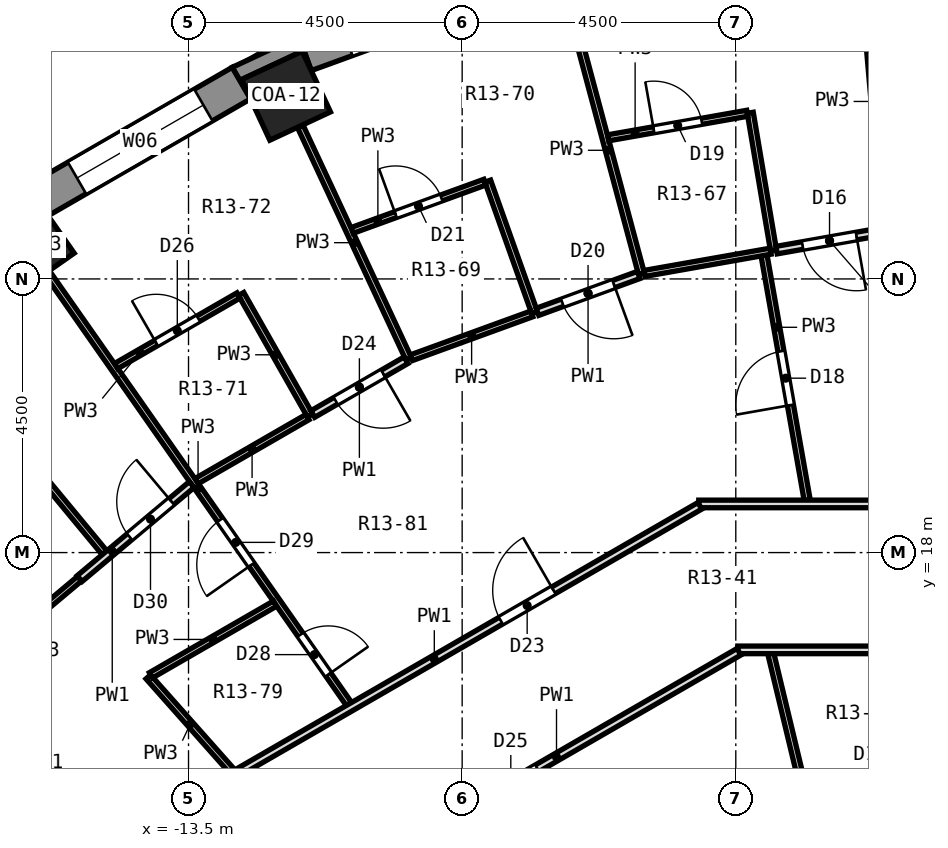
"""IFC4 building model, lengths in metres.
Left out: names, types, materials, properties, quantities, classifications, styles, units other than length and angle.
Written with IfcOpenShell. Run it as: python <this file> out.ifc"""

import sys

from ifc_helpers import new_model, si_unit, direction, frame, frame_2d, origin, origin_2d, place, context, subcontext, project, spatial, polyline, rectangle, outline, extrude, element, fill, save


model = new_model("IFC4")
c1 = context("Model", 3, precision=1e-05, world=origin(), true_north=direction((0.0, 1.0)))
c2 = subcontext(c1, "Body", "Model", "MODEL_VIEW")
j1 = project(units=[si_unit("LENGTHUNIT", "METRE"), si_unit("PLANEANGLEUNIT", "RADIAN")], contexts=[c1])
p1 = place(None, origin())
s1 = spatial("IfcSite", under=j1, at=p1, CompositionType="ELEMENT")
p2 = place(p1, origin())
s2 = spatial("IfcBuilding", under=s1, at=p2, CompositionType="ELEMENT")
p3 = place(p2, frame((0.0, 0.0, 65.9)))
s3 = spatial("IfcBuildingStorey", under=s2, at=p3, CompositionType="ELEMENT", Elevation=65.9)
for number, where, z_axis, x_axis in (
    (1, (-11.897, 25.512, 0.0), (0.0, 0.0, 1.0), (-0.423, 0.906, 0.0)),
    (2, (-16.146, 23.059, 0.0), (0.0, 0.0, 1.0), (-0.574, 0.819, 0.0)),
):
    element("IfcColumn", number, at=place(p3, frame(where, z_axis=z_axis, x_axis=x_axis)), inside=s3, PredefinedType="COLUMN", context=c2, shape_type="SweptSolid", body=[
        extrude(rectangle(XDim=1.1, YDim=1.1, at=origin_2d()), origin(), (0.0, 0.0, 1.0), 3.3),
    ])
p4 = place(p3, frame((-7.971, 27.523, 0.0), z_axis=(0.0, 0.0, 1.0), x_axis=(-0.939689588564, -0.342028474173, 0.0)))
e3 = element("IfcWall", 3, at=p4, inside=s3, PredefinedType="SOLIDWALL", context=c2, shape_type="SweptSolid", body=[
    extrude(rectangle(XDim=3.846, YDim=0.6, at=frame_2d((1.923, 0.0))), origin(), (0.0, 0.0, 1.0), 2.75),
])
p5 = place(p4, frame((0.723, 0.0, 0.9)))
e4 = element("IfcOpeningElement", 4, at=p5, cuts=e3, PredefinedType="OPENING", context=c2, shape_type="SweptSolid", body=[
    extrude(rectangle(XDim=2.4, YDim=1.8, at=frame_2d((1.2, 0.9))), frame((0.0, 0.312, 0.0), z_axis=(0.0, -1.0, 0.0), x_axis=(1.0, 0.0, 0.0)), (0.0, 0.0, 1.0), 0.624),
])
p6 = place(p3, frame((-12.63, 25.721, 0.0), z_axis=(0.0, 0.0, 1.0), x_axis=(-0.86603124159, -0.499989888488, 0.0)))
e5 = element("IfcWall", 5, at=p6, inside=s3, PredefinedType="SOLIDWALL", context=c2, shape_type="SweptSolid", body=[
    extrude(rectangle(XDim=3.846, YDim=0.6, at=frame_2d((1.923, 0.0))), origin(), (0.0, 0.0, 1.0), 2.75),
])
p7 = place(p6, frame((0.723, 0.0, 0.9)))
e6 = element("IfcOpeningElement", 6, at=p7, cuts=e5, PredefinedType="OPENING", context=c2, shape_type="SweptSolid", body=[
    extrude(rectangle(XDim=2.4, YDim=1.8, at=frame_2d((1.2, 0.9))), frame((0.0, 0.312, 0.0), z_axis=(0.0, -1.0, 0.0), x_axis=(1.0, 0.0, 0.0)), (0.0, 0.0, 1.0), 0.624),
])
p8 = place(p3, origin())
e7 = element("IfcWall", 7, at=p8, inside=s3, PredefinedType="SOLIDWALL", context=c2, shape_type="SweptSolid", body=[
    extrude(outline(polyline([(-12.78, 25.981), (-12.479, 25.461), (-12.628, 25.779), (-11.631, 26.243), (-11.483, 25.926), (-11.688, 26.49), (-12.78, 25.981)])), origin(), (0.0, 0.0, 1.0), 2.75),
])
p9 = place(p3, frame((-2.405, 27.485, 0.0), z_axis=(0.0, 0.0, 1.0), x_axis=(0.086512794622, -0.996250739707, 0.0)))
e8 = element("IfcWall", 8, at=p9, inside=s3, PredefinedType="PARTITIONING", context=c2, shape_type="SweptSolid", body=[
    extrude(rectangle(XDim=4.148, YDim=0.1, at=frame_2d((2.074, 0.0))), origin(), (0.0, 0.0, 1.0), 2.75),
])
p10 = place(p3, frame((-4.262, 25.233, 0.0), z_axis=(0.0, 0.0, 1.0), x_axis=(0.166550297596, -0.986032960083, 0.0)))
e9 = element("IfcWall", 9, at=p10, inside=s3, PredefinedType="PARTITIONING", context=c2, shape_type="SweptSolid", body=[
    extrude(rectangle(XDim=2.3, YDim=0.1, at=frame_2d((1.15, 0.0))), origin(), (0.0, 0.0, 1.0), 2.75),
])
p11 = place(p3, frame((-4.035, 22.887, 0.0), z_axis=(0.0, 0.0, 1.0), x_axis=(0.173584282426, -0.98481901733, 0.0)))
e10 = element("IfcWall", 10, at=p11, inside=s3, PredefinedType="PARTITIONING", context=c2, shape_type="SweptSolid", body=[
    extrude(rectangle(XDim=4.087, YDim=0.1, at=frame_2d((2.043, 0.0))), origin(), (0.0, 0.0, 1.0), 2.75),
])
p12 = place(p11, frame((1.6, 0.0, 0.0)))
e11 = element("IfcOpeningElement", 11, at=p12, cuts=e10, PredefinedType="OPENING", context=c2, shape_type="SweptSolid", body=[
    extrude(rectangle(XDim=0.9, YDim=2.1, at=frame_2d((0.45, 1.05))), frame((0.0, 0.062, 0.0), z_axis=(0.0, -1.0, 0.0), x_axis=(1.0, 0.0, 0.0)), (0.0, 0.0, 1.0), 0.124),
])
p13 = place(p3, frame((-3.924, 16.339, 0.0), z_axis=(0.0, 0.0, 1.0), x_axis=(0.233760395351, -0.972294234049, 0.0)))
e12 = element("IfcWall", 12, at=p13, inside=s3, PredefinedType="PARTITIONING", context=c2, shape_type="SweptSolid", body=[
    extrude(rectangle(XDim=2.097, YDim=0.1, at=frame_2d((1.049, 0.0))), origin(), (0.0, 0.0, 1.0), 2.75),
])
p14 = place(p3, frame((-7.14, 26.65, 0.0), z_axis=(0.0, 0.0, 1.0), x_axis=(0.258611481132, -0.965981418986, 0.0)))
e13 = element("IfcWall", 13, at=p14, inside=s3, PredefinedType="PARTITIONING", context=c2, shape_type="SweptSolid", body=[
    extrude(rectangle(XDim=4.211, YDim=0.1, at=frame_2d((2.106, 0.0))), origin(), (0.0, 0.0, 1.0), 2.75),
])
p15 = place(p3, frame((-8.579, 24.109, 0.0), z_axis=(0.0, 0.0, 1.0), x_axis=(0.335206501266, -0.942144681835, 0.0)))
e14 = element("IfcWall", 14, at=p15, inside=s3, PredefinedType="PARTITIONING", context=c2, shape_type="SweptSolid", body=[
    extrude(rectangle(XDim=2.3, YDim=0.1, at=frame_2d((1.15, 0.0))), origin(), (0.0, 0.0, 1.0), 2.75),
])
p16 = place(p3, frame((-11.66, 25.005, 0.0), z_axis=(0.0, 0.0, 1.0), x_axis=(0.422631582156, -0.906301575506, 0.0)))
e15 = element("IfcWall", 15, at=p16, inside=s3, PredefinedType="PARTITIONING", context=c2, shape_type="SweptSolid", body=[
    extrude(rectangle(XDim=4.212, YDim=0.1, at=frame_2d((2.106, 0.0))), origin(), (0.0, 0.0, 1.0), 2.75),
])
p17 = place(p3, frame((-12.635, 22.253, 0.0), z_axis=(0.0, 0.0, 1.0), x_axis=(0.493564284385, -0.869709317634, 0.0)))
e16 = element("IfcWall", 16, at=p17, inside=s3, PredefinedType="PARTITIONING", context=c2, shape_type="SweptSolid", body=[
    extrude(rectangle(XDim=2.3, YDim=0.1, at=frame_2d((1.15, 0.0))), origin(), (0.0, 0.0, 1.0), 2.75),
])
p18 = place(p3, frame((-15.825, 22.601, 0.0), z_axis=(0.0, 0.0, 1.0), x_axis=(0.57339608395, -0.819278298816, 0.0)))
e17 = element("IfcWall", 17, at=p18, inside=s3, PredefinedType="PARTITIONING", context=c2, shape_type="SweptSolid", body=[
    extrude(rectangle(XDim=8.655, YDim=0.1, at=frame_2d((4.328, 0.0))), origin(), (0.0, 0.0, 1.0), 2.75),
])
p19 = place(p18, frame((7.264, 0.0, 0.0)))
e18 = element("IfcOpeningElement", 18, at=p19, cuts=e17, PredefinedType="OPENING", context=c2, shape_type="SweptSolid", body=[
    extrude(rectangle(XDim=0.8, YDim=2.1, at=frame_2d((0.4, 1.05))), frame((0.0, 0.062, 0.0), z_axis=(0.0, -1.0, 0.0), x_axis=(1.0, 0.0, 0.0)), (0.0, 0.0, 1.0), 0.124),
])
p20 = place(p18, frame((4.96, 0.0, 0.0)))
e19 = element("IfcOpeningElement", 19, at=p20, cuts=e17, PredefinedType="OPENING", context=c2, shape_type="SweptSolid", body=[
    extrude(rectangle(XDim=0.9, YDim=2.1, at=frame_2d((0.45, 1.05))), frame((0.0, 0.062, 0.0), z_axis=(0.0, -1.0, 0.0), x_axis=(1.0, 0.0, 0.0)), (0.0, 0.0, 1.0), 0.124),
])
p21 = place(p3, frame((-16.308, 19.721, 0.0), z_axis=(0.0, 0.0, 1.0), x_axis=(0.637464982276, -0.770479328971, 0.0)))
e20 = element("IfcWall", 20, at=p21, inside=s3, PredefinedType="PARTITIONING", context=c2, shape_type="SweptSolid", body=[
    extrude(rectangle(XDim=2.237, YDim=0.1, at=frame_2d((1.119, 0.0))), origin(), (0.0, 0.0, 1.0), 2.75),
])
p22 = place(p3, frame((-14.162, 15.957, 0.0), z_axis=(0.0, 0.0, 1.0), x_axis=(0.663919519931, -0.747804032521, 0.0)))
e21 = element("IfcWall", 21, at=p22, inside=s3, PredefinedType="PARTITIONING", context=c2, shape_type="SweptSolid", body=[
    extrude(rectangle(XDim=2.081, YDim=0.1, at=frame_2d((1.041, 0.0))), origin(), (0.0, 0.0, 1.0), 2.75),
])
p23 = place(p3, frame((-4.466, 16.4, 0.0), z_axis=(0.0, 0.0, 1.0), x_axis=(1.0, 0.0, 0.0)))
e22 = element("IfcWall", 22, at=p23, inside=s3, PredefinedType="PARTITIONING", context=c2, shape_type="SweptSolid", body=[
    extrude(rectangle(XDim=8.798, YDim=0.125, at=frame_2d((4.399, 0.0))), origin(), (0.0, 0.0, 1.0), 2.75),
])
p24 = place(p3, frame((-5.109, 18.8, 0.0), z_axis=(0.0, 0.0, 1.0), x_axis=(1.0, 0.0, 0.0)))
e23 = element("IfcWall", 23, at=p24, inside=s3, PredefinedType="PARTITIONING", context=c2, shape_type="SweptSolid", body=[
    extrude(rectangle(XDim=10.084, YDim=0.125, at=frame_2d((5.042, 0.0))), origin(), (0.0, 0.0, 1.0), 2.75),
])
p25 = place(p3, frame((-6.002, 22.591, 0.0), z_axis=(0.0, 0.0, 1.0), x_axis=(0.984798730273, 0.173699340392, 0.0)))
e24 = element("IfcWall", 24, at=p25, inside=s3, PredefinedType="PARTITIONING", context=c2, shape_type="SweptSolid", body=[
    extrude(rectangle(XDim=2.105, YDim=0.1, at=frame_2d((1.053, 0.0))), origin(), (0.0, 0.0, 1.0), 2.75),
])
p26 = place(p3, frame((-3.83, 22.974, 0.0), z_axis=(0.0, 0.0, 1.0), x_axis=(0.98477522439, 0.17383255572, 0.0)))
e25 = element("IfcWall", 25, at=p26, inside=s3, PredefinedType="PARTITIONING", context=c2, shape_type="SweptSolid", body=[
    extrude(rectangle(XDim=1.77, YDim=0.125, at=frame_2d((0.885, 0.0))), origin(), (0.0, 0.0, 1.0), 2.75),
])
p27 = place(p26, frame((0.435, 0.0, 0.0)))
e26 = element("IfcOpeningElement", 26, at=p27, cuts=e25, PredefinedType="OPENING", context=c2, shape_type="SweptSolid", body=[
    extrude(rectangle(XDim=0.9, YDim=2.1, at=frame_2d((0.45, 1.05))), frame((0.0, 0.074, 0.0), z_axis=(0.0, -1.0, 0.0), x_axis=(1.0, 0.0, 0.0)), (0.0, 0.0, 1.0), 0.149),
])
p28 = place(p3, frame((-6.599, 24.821, 0.0), z_axis=(0.0, 0.0, 1.0), x_axis=(0.984793079882, 0.173731372577, 0.0)))
e27 = element("IfcWall", 27, at=p28, inside=s3, PredefinedType="PARTITIONING", context=c2, shape_type="SweptSolid", body=[
    extrude(rectangle(XDim=2.323, YDim=0.1, at=frame_2d((1.162, 0.0))), origin(), (0.0, 0.0, 1.0), 2.75),
])
p29 = place(p28, frame((0.761, 0.0, 0.0)))
e28 = element("IfcOpeningElement", 28, at=p29, cuts=e27, PredefinedType="OPENING", context=c2, shape_type="SweptSolid", body=[
    extrude(rectangle(XDim=0.8, YDim=2.1, at=frame_2d((0.4, 1.05))), frame((0.0, 0.062, 0.0), z_axis=(0.0, -1.0, 0.0), x_axis=(1.0, 0.0, 0.0)), (0.0, 0.0, 1.0), 0.124),
])
p30 = place(p3, frame((-9.833, 21.205, 0.0), z_axis=(0.0, 0.0, 1.0), x_axis=(0.939725675468, 0.341929312674, 0.0)))
e29 = element("IfcWall", 29, at=p30, inside=s3, PredefinedType="PARTITIONING", context=c2, shape_type="SweptSolid", body=[
    extrude(rectangle(XDim=2.105, YDim=0.1, at=frame_2d((1.052, 0.0))), origin(), (0.0, 0.0, 1.0), 2.75),
])
p31 = place(p3, frame((-7.761, 21.959, 0.0), z_axis=(0.0, 0.0, 1.0), x_axis=(0.939620127684, 0.342219250849, 0.0)))
e30 = element("IfcWall", 30, at=p31, inside=s3, PredefinedType="PARTITIONING", context=c2, shape_type="SweptSolid", body=[
    extrude(rectangle(XDim=1.77, YDim=0.125, at=frame_2d((0.885, 0.0))), origin(), (0.0, 0.0, 1.0), 2.75),
])
p32 = place(p31, frame((0.435, 0.0, 0.0)))
e31 = element("IfcOpeningElement", 31, at=p32, cuts=e30, PredefinedType="OPENING", context=c2, shape_type="SweptSolid", body=[
    extrude(rectangle(XDim=0.9, YDim=2.1, at=frame_2d((0.45, 1.05))), frame((0.0, 0.074, 0.0), z_axis=(0.0, -1.0, 0.0), x_axis=(1.0, 0.0, 0.0)), (0.0, 0.0, 1.0), 0.149),
])
p33 = place(p3, frame((-10.809, 23.298, 0.0), z_axis=(0.0, 0.0, 1.0), x_axis=(0.939802630001, 0.341717744115, 0.0)))
e32 = element("IfcWall", 32, at=p33, inside=s3, PredefinedType="PARTITIONING", context=c2, shape_type="SweptSolid", body=[
    extrude(rectangle(XDim=2.323, YDim=0.1, at=frame_2d((1.161, 0.0))), origin(), (0.0, 0.0, 1.0), 2.75),
])
p34 = place(p33, frame((0.761, 0.0, 0.0)))
e33 = element("IfcOpeningElement", 33, at=p34, cuts=e32, PredefinedType="OPENING", context=c2, shape_type="SweptSolid", body=[
    extrude(rectangle(XDim=0.8, YDim=2.1, at=frame_2d((0.4, 1.05))), frame((0.0, 0.062, 0.0), z_axis=(0.0, -1.0, 0.0), x_axis=(1.0, 0.0, 0.0)), (0.0, 0.0, 1.0), 0.124),
])
p35 = place(p3, frame((-11.952, 12.037, 0.0), z_axis=(0.0, 0.0, 1.0), x_axis=(0.866072505035, 0.499918409365, 0.0)))
e34 = element("IfcWall", 34, at=p35, inside=s3, PredefinedType="PARTITIONING", context=c2, shape_type="SweptSolid", body=[
    extrude(rectangle(XDim=8.664, YDim=0.125, at=frame_2d((4.332, 0.0))), origin(), (0.0, 0.0, 1.0), 2.75),
])
p36 = place(p35, frame((3.832, 0.0, 0.0)))
e35 = element("IfcOpeningElement", 35, at=p36, cuts=e34, PredefinedType="OPENING", context=c2, shape_type="SweptSolid", body=[
    extrude(rectangle(XDim=1.0, YDim=2.1, at=frame_2d((0.5, 1.05))), frame((0.0, 0.074, 0.0), z_axis=(0.0, -1.0, 0.0), x_axis=(1.0, 0.0, 0.0)), (0.0, 0.0, 1.0), 0.149),
])
p37 = place(p3, frame((-13.825, 13.727, 0.0), z_axis=(0.0, 0.0, 1.0), x_axis=(0.866059817553, 0.499940388867, 0.0)))
e36 = element("IfcWall", 36, at=p37, inside=s3, PredefinedType="PARTITIONING", context=c2, shape_type="SweptSolid", body=[
    extrude(rectangle(XDim=10.085, YDim=0.125, at=frame_2d((5.042, 0.0))), origin(), (0.0, 0.0, 1.0), 2.75),
])
p38 = place(p37, frame((6.306, 0.0, 0.0)))
e37 = element("IfcOpeningElement", 37, at=p38, cuts=e36, PredefinedType="OPENING", context=c2, shape_type="SweptSolid", body=[
    extrude(rectangle(XDim=1.0, YDim=2.1, at=frame_2d((0.5, 1.05))), frame((0.0, 0.074, 0.0), z_axis=(0.0, -1.0, 0.0), x_axis=(1.0, 0.0, 0.0)), (0.0, 0.0, 1.0), 0.149),
])
p39 = place(p3, frame((-14.119, 15.982, 0.0), z_axis=(0.0, 0.0, 1.0), x_axis=(0.865945816379, 0.5001378241, 0.0)))
e38 = element("IfcWall", 38, at=p39, inside=s3, PredefinedType="PARTITIONING", context=c2, shape_type="SweptSolid", body=[
    extrude(rectangle(XDim=2.357, YDim=0.1, at=frame_2d((1.179, 0.0))), origin(), (0.0, 0.0, 1.0), 2.75),
])
p40 = place(p3, frame((-13.366, 19.176, 0.0), z_axis=(0.0, 0.0, 1.0), x_axis=(0.866071606143, 0.499919966627, 0.0)))
e39 = element("IfcWall", 39, at=p40, inside=s3, PredefinedType="PARTITIONING", context=c2, shape_type="SweptSolid", body=[
    extrude(rectangle(XDim=2.104, YDim=0.1, at=frame_2d((1.052, 0.0))), origin(), (0.0, 0.0, 1.0), 2.75),
])
p41 = place(p3, frame((-11.457, 20.278, 0.0), z_axis=(0.0, 0.0, 1.0), x_axis=(0.86610522661, 0.499861717316, 0.0)))
e40 = element("IfcWall", 40, at=p41, inside=s3, PredefinedType="PARTITIONING", context=c2, shape_type="SweptSolid", body=[
    extrude(rectangle(XDim=1.771, YDim=0.125, at=frame_2d((0.885, 0.0))), origin(), (0.0, 0.0, 1.0), 2.75),
])
p42 = place(p41, frame((0.435, 0.0, 0.0)))
e41 = element("IfcOpeningElement", 41, at=p42, cuts=e40, PredefinedType="OPENING", context=c2, shape_type="SweptSolid", body=[
    extrude(rectangle(XDim=0.9, YDim=2.1, at=frame_2d((0.45, 1.05))), frame((0.0, 0.074, 0.0), z_axis=(0.0, -1.0, 0.0), x_axis=(1.0, 0.0, 0.0)), (0.0, 0.0, 1.0), 0.149),
])
p43 = place(p3, frame((-14.691, 21.067, 0.0), z_axis=(0.0, 0.0, 1.0), x_axis=(0.866166342301, 0.499755807835, 0.0)))
e42 = element("IfcWall", 42, at=p43, inside=s3, PredefinedType="PARTITIONING", context=c2, shape_type="SweptSolid", body=[
    extrude(rectangle(XDim=2.323, YDim=0.1, at=frame_2d((1.162, 0.0))), origin(), (0.0, 0.0, 1.0), 2.75),
])
p44 = place(p43, frame((0.762, 0.0, 0.0)))
e43 = element("IfcOpeningElement", 43, at=p44, cuts=e42, PredefinedType="OPENING", context=c2, shape_type="SweptSolid", body=[
    extrude(rectangle(XDim=0.8, YDim=2.1, at=frame_2d((0.4, 1.05))), frame((0.0, 0.062, 0.0), z_axis=(0.0, -1.0, 0.0), x_axis=(1.0, 0.0, 0.0)), (0.0, 0.0, 1.0), 0.124),
])
p45 = place(p3, frame((-16.493, 16.563, 0.0), z_axis=(0.0, 0.0, 1.0), x_axis=(0.765882590802, 0.642980448463, 0.0)))
e44 = element("IfcWall", 44, at=p45, inside=s3, PredefinedType="PARTITIONING", context=c2, shape_type="SweptSolid", body=[
    extrude(rectangle(XDim=1.569, YDim=0.1, at=frame_2d((0.785, 0.0))), origin(), (0.0, 0.0, 1.0), 2.75),
])
p46 = place(p3, frame((-15.291, 17.572, 0.0), z_axis=(0.0, 0.0, 1.0), x_axis=(0.766188320354, 0.642616104492, 0.0)))
e45 = element("IfcWall", 45, at=p46, inside=s3, PredefinedType="PARTITIONING", context=c2, shape_type="SweptSolid", body=[
    extrude(rectangle(XDim=2.406, YDim=0.125, at=frame_2d((1.203, 0.0))), origin(), (0.0, 0.0, 1.0), 2.75),
])
p47 = place(p46, frame((1.071, 0.0, 0.0)))
e46 = element("IfcOpeningElement", 46, at=p47, cuts=e45, PredefinedType="OPENING", context=c2, shape_type="SweptSolid", body=[
    extrude(rectangle(XDim=0.9, YDim=2.1, at=frame_2d((0.45, 1.05))), frame((0.0, 0.074, 0.0), z_axis=(0.0, -1.0, 0.0), x_axis=(1.0, 0.0, 0.0)), (0.0, 0.0, 1.0), 0.149),
])
p48 = place(p7, origin())
e47 = element("IfcWindow", 47, at=p48, inside=s3, PartitioningType="SINGLE_PANEL", PredefinedType="WINDOW", context=c2, shape_type="SweptSolid", body=[
    extrude(rectangle(XDim=2.4, YDim=1.8, at=frame_2d((1.2, 0.9))), frame((0.0, 0.18, 0.0), z_axis=(0.0, -1.0, 0.0), x_axis=(1.0, 0.0, 0.0)), (0.0, 0.0, 1.0), 0.06),
])
fill(e6, e47)
p49 = place(p27, frame((0.9, 0.0, 0.0), z_axis=(0.0, 0.0, 1.0), x_axis=(-1.0, 0.0, 0.0)))
e48 = element("IfcDoor", 48, at=p49, inside=s3, OperationType="SINGLE_SWING_LEFT", PredefinedType="DOOR", context=c2, shape_type="SweptSolid", body=[
    extrude(rectangle(XDim=0.9, YDim=2.1, at=frame_2d((0.45, 1.05))), frame((0.0, 0.025, 0.0), z_axis=(0.0, -1.0, 0.0), x_axis=(1.0, 0.0, 0.0)), (0.0, 0.0, 1.0), 0.05),
])
fill(e26, e48)
p50 = place(p12, frame((0.9, 0.0, 0.0), z_axis=(0.0, 0.0, 1.0), x_axis=(-1.0, 0.0, 0.0)))
e49 = element("IfcDoor", 49, at=p50, inside=s3, OperationType="SINGLE_SWING_LEFT", PredefinedType="DOOR", context=c2, shape_type="SweptSolid", body=[
    extrude(rectangle(XDim=0.9, YDim=2.1, at=frame_2d((0.45, 1.05))), frame((0.0, 0.025, 0.0), z_axis=(0.0, -1.0, 0.0), x_axis=(1.0, 0.0, 0.0)), (0.0, 0.0, 1.0), 0.05),
])
fill(e11, e49)
p51 = place(p29, origin())
e50 = element("IfcDoor", 50, at=p51, inside=s3, OperationType="SINGLE_SWING_LEFT", PredefinedType="DOOR", context=c2, shape_type="SweptSolid", body=[
    extrude(rectangle(XDim=0.8, YDim=2.1, at=frame_2d((0.4, 1.05))), frame((0.0, 0.025, 0.0), z_axis=(0.0, -1.0, 0.0), x_axis=(1.0, 0.0, 0.0)), (0.0, 0.0, 1.0), 0.05),
])
fill(e28, e50)
p52 = place(p32, frame((0.9, 0.0, 0.0), z_axis=(0.0, 0.0, 1.0), x_axis=(-1.0, 0.0, 0.0)))
e51 = element("IfcDoor", 51, at=p52, inside=s3, OperationType="SINGLE_SWING_LEFT", PredefinedType="DOOR", context=c2, shape_type="SweptSolid", body=[
    extrude(rectangle(XDim=0.9, YDim=2.1, at=frame_2d((0.45, 1.05))), frame((0.0, 0.025, 0.0), z_axis=(0.0, -1.0, 0.0), x_axis=(1.0, 0.0, 0.0)), (0.0, 0.0, 1.0), 0.05),
])
fill(e31, e51)
p53 = place(p34, origin())
e52 = element("IfcDoor", 52, at=p53, inside=s3, OperationType="SINGLE_SWING_LEFT", PredefinedType="DOOR", context=c2, shape_type="SweptSolid", body=[
    extrude(rectangle(XDim=0.8, YDim=2.1, at=frame_2d((0.4, 1.05))), frame((0.0, 0.025, 0.0), z_axis=(0.0, -1.0, 0.0), x_axis=(1.0, 0.0, 0.0)), (0.0, 0.0, 1.0), 0.05),
])
fill(e33, e52)
p54 = place(p38, origin())
e53 = element("IfcDoor", 53, at=p54, inside=s3, OperationType="SINGLE_SWING_RIGHT", PredefinedType="DOOR", context=c2, shape_type="SweptSolid", body=[
    extrude(rectangle(XDim=1.0, YDim=2.1, at=frame_2d((0.5, 1.05))), frame((0.0, 0.025, 0.0), z_axis=(0.0, -1.0, 0.0), x_axis=(1.0, 0.0, 0.0)), (0.0, 0.0, 1.0), 0.05),
])
fill(e37, e53)
p55 = place(p42, frame((0.9, 0.0, 0.0), z_axis=(0.0, 0.0, 1.0), x_axis=(-1.0, 0.0, 0.0)))
e54 = element("IfcDoor", 54, at=p55, inside=s3, OperationType="SINGLE_SWING_LEFT", PredefinedType="DOOR", context=c2, shape_type="SweptSolid", body=[
    extrude(rectangle(XDim=0.9, YDim=2.1, at=frame_2d((0.45, 1.05))), frame((0.0, 0.025, 0.0), z_axis=(0.0, -1.0, 0.0), x_axis=(1.0, 0.0, 0.0)), (0.0, 0.0, 1.0), 0.05),
])
fill(e41, e54)
p56 = place(p36, frame((1.0, 0.0, 0.0), z_axis=(0.0, 0.0, 1.0), x_axis=(-1.0, 0.0, 0.0)))
e55 = element("IfcDoor", 55, at=p56, inside=s3, OperationType="SINGLE_SWING_LEFT", PredefinedType="DOOR", context=c2, shape_type="SweptSolid", body=[
    extrude(rectangle(XDim=1.0, YDim=2.1, at=frame_2d((0.5, 1.05))), frame((0.0, 0.025, 0.0), z_axis=(0.0, -1.0, 0.0), x_axis=(1.0, 0.0, 0.0)), (0.0, 0.0, 1.0), 0.05),
])
fill(e35, e55)
p57 = place(p44, origin())
e56 = element("IfcDoor", 56, at=p57, inside=s3, OperationType="SINGLE_SWING_LEFT", PredefinedType="DOOR", context=c2, shape_type="SweptSolid", body=[
    extrude(rectangle(XDim=0.8, YDim=2.1, at=frame_2d((0.4, 1.05))), frame((0.0, 0.025, 0.0), z_axis=(0.0, -1.0, 0.0), x_axis=(1.0, 0.0, 0.0)), (0.0, 0.0, 1.0), 0.05),
])
fill(e43, e56)
p58 = place(p19, origin())
e57 = element("IfcDoor", 57, at=p58, inside=s3, OperationType="SINGLE_SWING_RIGHT", PredefinedType="DOOR", context=c2, shape_type="SweptSolid", body=[
    extrude(rectangle(XDim=0.8, YDim=2.1, at=frame_2d((0.4, 1.05))), frame((0.0, 0.025, 0.0), z_axis=(0.0, -1.0, 0.0), x_axis=(1.0, 0.0, 0.0)), (0.0, 0.0, 1.0), 0.05),
])
fill(e18, e57)
p59 = place(p20, frame((0.9, 0.0, 0.0), z_axis=(0.0, 0.0, 1.0), x_axis=(-1.0, 0.0, 0.0)))
e58 = element("IfcDoor", 58, at=p59, inside=s3, OperationType="SINGLE_SWING_LEFT", PredefinedType="DOOR", context=c2, shape_type="SweptSolid", body=[
    extrude(rectangle(XDim=0.9, YDim=2.1, at=frame_2d((0.45, 1.05))), frame((0.0, 0.025, 0.0), z_axis=(0.0, -1.0, 0.0), x_axis=(1.0, 0.0, 0.0)), (0.0, 0.0, 1.0), 0.05),
])
fill(e19, e58)
p60 = place(p47, origin())
e59 = element("IfcDoor", 59, at=p60, inside=s3, OperationType="SINGLE_SWING_RIGHT", PredefinedType="DOOR", context=c2, shape_type="SweptSolid", body=[
    extrude(rectangle(XDim=0.9, YDim=2.1, at=frame_2d((0.45, 1.05))), frame((0.0, 0.025, 0.0), z_axis=(0.0, -1.0, 0.0), x_axis=(1.0, 0.0, 0.0)), (0.0, 0.0, 1.0), 0.05),
])
fill(e46, e59)
save(model, sys.argv[1])
